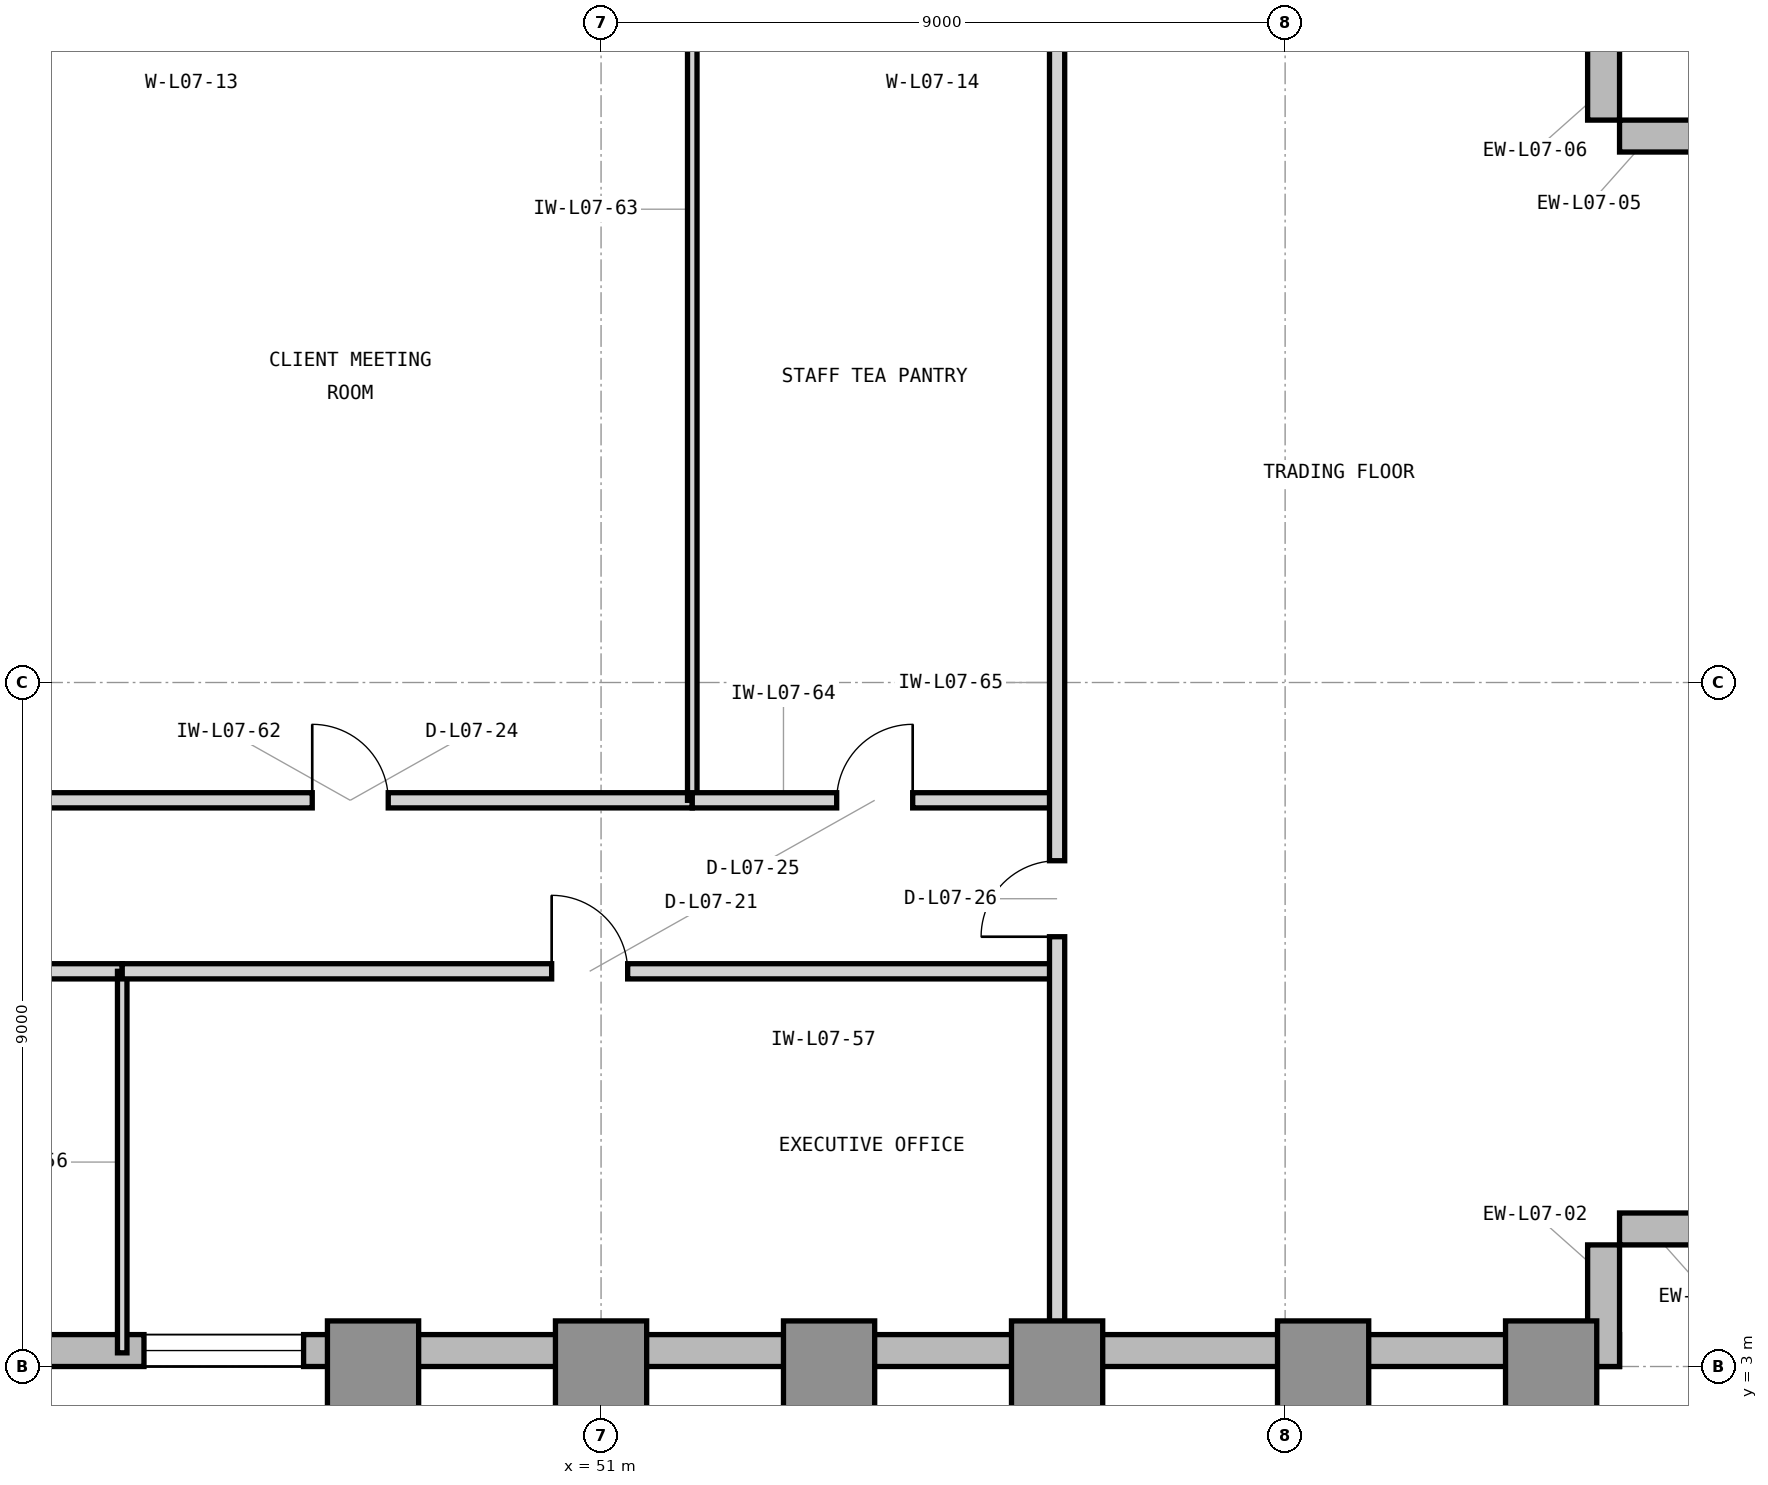
"""IFC4 building model, lengths in metres.
Left out: names, types, materials, properties, quantities, classifications, styles, units other than length and angle.
Written with IfcOpenShell. Run it as: python <this file> out.ifc"""

import sys

from ifc_helpers import new_model, si_unit, direction, frame, frame_2d, origin, origin_2d, place, context, subcontext, project, spatial, rectangle, extrude, element, fill, save


model = new_model("IFC4")
c1 = context("Model", 3, precision=1e-05, world=origin(), true_north=direction((0.0, 1.0)))
c2 = subcontext(c1, "Body", "Model", "MODEL_VIEW")
j1 = project(units=[si_unit("LENGTHUNIT", "METRE"), si_unit("PLANEANGLEUNIT", "RADIAN")], contexts=[c1])
p1 = place(None, origin())
s1 = spatial("IfcSite", under=j1, at=p1, CompositionType="ELEMENT")
p2 = place(p1, origin())
s2 = spatial("IfcBuilding", under=s1, at=p2, CompositionType="ELEMENT")
p3 = place(p2, frame((0.0, 0.0, 34.2)))
s3 = spatial("IfcBuildingStorey", under=s2, at=p3, CompositionType="ELEMENT", Elevation=34.2)
for number, where, z_axis, x_axis in (
    (1, (48.0, 3.0, 0.0), (0.0, 0.0, 1.0), (1.0, 0.0, 0.0)),
    (2, (51.0, 3.0, 0.0), (0.0, 0.0, 1.0), (1.0, 0.0, 0.0)),
    (3, (54.0, 3.0, 0.0), (0.0, 0.0, 1.0), (1.0, 0.0, 0.0)),
    (4, (57.0, 3.0, 0.0), (0.0, 0.0, 1.0), (1.0, 0.0, 0.0)),
    (5, (60.5, 3.0, 0.0), (0.0, 0.0, 1.0), (1.0, 0.0, 0.0)),
    (6, (63.5, 3.0, 0.0), (0.0, 0.0, 1.0), (1.0, 0.0, 0.0)),
):
    element("IfcColumn", number, at=place(p3, frame(where, z_axis=z_axis, x_axis=x_axis)), inside=s3, PredefinedType="COLUMN", context=c2, shape_type="SweptSolid", body=[
        extrude(rectangle(XDim=1.2, YDim=1.2, at=origin_2d()), origin(), (0.0, 0.0, 1.0), 4.2),
    ])
p4 = place(p3, frame((23.9, 3.21, 0.0), z_axis=(0.0, 0.0, 1.0), x_axis=(1.0, 0.0, 0.0)))
e7 = element("IfcWall", 7, at=p4, inside=s3, PredefinedType="STANDARD", context=c2, shape_type="SweptSolid", body=[
    extrude(rectangle(XDim=40.5, YDim=0.42, at=frame_2d((20.25, 0.0))), origin(), (0.0, 0.0, 1.0), 3.98),
])
p5 = place(p4, frame((1.1, 0.0, 0.85)))
e8 = element("IfcOpeningElement", 8, at=p5, cuts=e7, PredefinedType="OPENING", context=c2, shape_type="SweptSolid", body=[
    extrude(rectangle(XDim=1.2, YDim=2.45, at=frame_2d((0.6, 1.225))), frame((0.0, 0.22, 0.0), z_axis=(0.0, -1.0, 0.0), x_axis=(1.0, 0.0, 0.0)), (0.0, 0.0, 1.0), 0.44),
])
p6 = place(p4, frame((5.336, 0.0, 0.85)))
e9 = element("IfcOpeningElement", 9, at=p6, cuts=e7, PredefinedType="OPENING", context=c2, shape_type="SweptSolid", body=[
    extrude(rectangle(XDim=2.8, YDim=2.45, at=frame_2d((1.4, 1.225))), frame((0.0, 0.22, 0.0), z_axis=(0.0, -1.0, 0.0), x_axis=(1.0, 0.0, 0.0)), (0.0, 0.0, 1.0), 0.44),
])
p7 = place(p4, frame((14.336, 0.0, 0.85)))
e10 = element("IfcOpeningElement", 10, at=p7, cuts=e7, PredefinedType="OPENING", context=c2, shape_type="SweptSolid", body=[
    extrude(rectangle(XDim=2.8, YDim=2.45, at=frame_2d((1.4, 1.225))), frame((0.0, 0.22, 0.0), z_axis=(0.0, -1.0, 0.0), x_axis=(1.0, 0.0, 0.0)), (0.0, 0.0, 1.0), 0.44),
])
p8 = place(p4, frame((21.086, 0.0, 0.85)))
e11 = element("IfcOpeningElement", 11, at=p8, cuts=e7, PredefinedType="OPENING", context=c2, shape_type="SweptSolid", body=[
    extrude(rectangle(XDim=2.1, YDim=2.45, at=frame_2d((1.05, 1.225))), frame((0.0, 0.22, 0.0), z_axis=(0.0, -1.0, 0.0), x_axis=(1.0, 0.0, 0.0)), (0.0, 0.0, 1.0), 0.44),
])
for number, where, z_axis, x_axis in (
    (12, (64.19, 3.0, 0.0), (0.0, 0.0, 1.0), (0.0, 1.0, 0.0)),
    (13, (64.4, 4.81, 0.0), (0.0, 0.0, 1.0), (1.0, 0.0, 0.0)),
    (14, (66.0, 19.19, 0.0), (0.0, 0.0, 1.0), (-1.0, 0.0, 0.0)),
    (15, (64.19, 19.4, 0.0), (0.0, 0.0, 1.0), (0.0, 1.0, 0.0)),
):
    element("IfcWall", number, at=place(p3, frame(where, z_axis=z_axis, x_axis=x_axis)), inside=s3, PredefinedType="STANDARD", context=c2, shape_type="SweptSolid", body=[
        extrude(rectangle(XDim=1.6, YDim=0.42, at=frame_2d((0.8, 0.0))), origin(), (0.0, 0.0, 1.0), 3.98),
    ])
p9 = place(p3, frame((35.7, 8.2, 0.0), z_axis=(0.0, 0.0, 1.0), x_axis=(1.0, 0.0, 0.0)))
e16 = element("IfcWall", 16, at=p9, inside=s3, PredefinedType="PARTITIONING", context=c2, shape_type="SweptSolid", body=[
    extrude(rectangle(XDim=9.0, YDim=0.2, at=frame_2d((4.5, 0.0))), origin(), (0.0, 0.0, 1.0), 3.97),
])
p10 = place(p9, frame((3.5, 0.0, 0.0)))
e17 = element("IfcOpeningElement", 17, at=p10, cuts=e16, PredefinedType="OPENING", context=c2, shape_type="SweptSolid", body=[
    extrude(rectangle(XDim=2.0, YDim=2.5, at=frame_2d((1.0, 1.25))), frame((0.0, 0.11, 0.0), z_axis=(0.0, -1.0, 0.0), x_axis=(1.0, 0.0, 0.0)), (0.0, 0.0, 1.0), 0.22),
])
p11 = place(p3, frame((44.7, 3.18, 0.0), z_axis=(0.0, 0.0, 1.0), x_axis=(0.0, 1.0, 0.0)))
e18 = element("IfcWall", 18, at=p11, inside=s3, PredefinedType="PARTITIONING", context=c2, shape_type="SweptSolid", body=[
    extrude(rectangle(XDim=5.02, YDim=0.125, at=frame_2d((2.51, 0.0))), origin(), (0.0, 0.0, 1.0), 3.97),
])
p12 = place(p3, frame((44.7, 8.2, 0.0), z_axis=(0.0, 0.0, 1.0), x_axis=(1.0, 0.0, 0.0)))
e19 = element("IfcWall", 19, at=p12, inside=s3, PredefinedType="PARTITIONING", context=c2, shape_type="SweptSolid", body=[
    extrude(rectangle(XDim=12.3, YDim=0.2, at=frame_2d((6.15, 0.0))), origin(), (0.0, 0.0, 1.0), 3.97),
])
p13 = place(p12, frame((5.65, 0.0, 0.0)))
e20 = element("IfcOpeningElement", 20, at=p13, cuts=e19, PredefinedType="OPENING", context=c2, shape_type="SweptSolid", body=[
    extrude(rectangle(XDim=1.0, YDim=2.15, at=frame_2d((0.5, 1.075))), frame((0.0, 0.11, 0.0), z_axis=(0.0, -1.0, 0.0), x_axis=(1.0, 0.0, 0.0)), (0.0, 0.0, 1.0), 0.22),
])
p14 = place(p3, frame((43.2, 10.45, 0.0), z_axis=(0.0, 0.0, 1.0), x_axis=(1.0, 0.0, 0.0)))
e21 = element("IfcWall", 21, at=p14, inside=s3, PredefinedType="PARTITIONING", context=c2, shape_type="SweptSolid", body=[
    extrude(rectangle(XDim=9.0, YDim=0.2, at=frame_2d((4.5, 0.0))), origin(), (0.0, 0.0, 1.0), 3.97),
])
p15 = place(p14, frame((4.0, 0.0, 0.0)))
e22 = element("IfcOpeningElement", 22, at=p15, cuts=e21, PredefinedType="OPENING", context=c2, shape_type="SweptSolid", body=[
    extrude(rectangle(XDim=1.0, YDim=2.15, at=frame_2d((0.5, 1.075))), frame((0.0, 0.11, 0.0), z_axis=(0.0, -1.0, 0.0), x_axis=(1.0, 0.0, 0.0)), (0.0, 0.0, 1.0), 0.22),
])
p16 = place(p3, frame((52.2, 10.45, 0.0), z_axis=(0.0, 0.0, 1.0), x_axis=(0.0, 1.0, 0.0)))
e23 = element("IfcWall", 23, at=p16, inside=s3, PredefinedType="PARTITIONING", context=c2, shape_type="SweptSolid", body=[
    extrude(rectangle(XDim=10.37, YDim=0.125, at=frame_2d((5.185, 0.0))), origin(), (0.0, 0.0, 1.0), 3.97),
])
p17 = place(p3, frame((52.2, 10.45, 0.0), z_axis=(0.0, 0.0, 1.0), x_axis=(1.0, 0.0, 0.0)))
e24 = element("IfcWall", 24, at=p17, inside=s3, PredefinedType="PARTITIONING", context=c2, shape_type="SweptSolid", body=[
    extrude(rectangle(XDim=4.8, YDim=0.2, at=frame_2d((2.4, 0.0))), origin(), (0.0, 0.0, 1.0), 3.97),
])
p18 = place(p17, frame((1.9, 0.0, 0.0)))
e25 = element("IfcOpeningElement", 25, at=p18, cuts=e24, PredefinedType="OPENING", context=c2, shape_type="SweptSolid", body=[
    extrude(rectangle(XDim=1.0, YDim=2.15, at=frame_2d((0.5, 1.075))), frame((0.0, 0.11, 0.0), z_axis=(0.0, -1.0, 0.0), x_axis=(1.0, 0.0, 0.0)), (0.0, 0.0, 1.0), 0.22),
])
p19 = place(p3, frame((57.0, 3.18, 0.0), z_axis=(0.0, 0.0, 1.0), x_axis=(0.0, 1.0, 0.0)))
e26 = element("IfcWall", 26, at=p19, inside=s3, PredefinedType="PARTITIONING", context=c2, shape_type="SweptSolid", body=[
    extrude(rectangle(XDim=17.64, YDim=0.2, at=frame_2d((8.82, 0.0))), origin(), (0.0, 0.0, 1.0), 3.114),
])
p20 = place(p19, frame((5.475, 0.0, 0.0)))
e27 = element("IfcOpeningElement", 27, at=p20, cuts=e26, PredefinedType="OPENING", context=c2, shape_type="SweptSolid", body=[
    extrude(rectangle(XDim=1.0, YDim=2.15, at=frame_2d((0.5, 1.075))), frame((0.0, 0.11, 0.0), z_axis=(0.0, -1.0, 0.0), x_axis=(1.0, 0.0, 0.0)), (0.0, 0.0, 1.0), 0.22),
])
p21 = place(p13, origin())
e28 = element("IfcDoor", 28, at=p21, inside=s3, OperationType="SINGLE_SWING_LEFT", PredefinedType="DOOR", context=c2, shape_type="SweptSolid", body=[
    extrude(rectangle(XDim=1.0, YDim=2.15, at=frame_2d((0.5, 1.075))), frame((0.0, 0.025, 0.0), z_axis=(0.0, -1.0, 0.0), x_axis=(1.0, 0.0, 0.0)), (0.0, 0.0, 1.0), 0.05),
])
fill(e20, e28)
p22 = place(p15, origin())
e29 = element("IfcDoor", 29, at=p22, inside=s3, OperationType="SINGLE_SWING_LEFT", PredefinedType="DOOR", context=c2, shape_type="SweptSolid", body=[
    extrude(rectangle(XDim=1.0, YDim=2.15, at=frame_2d((0.5, 1.075))), frame((0.0, 0.025, 0.0), z_axis=(0.0, -1.0, 0.0), x_axis=(1.0, 0.0, 0.0)), (0.0, 0.0, 1.0), 0.05),
])
fill(e22, e29)
p23 = place(p18, origin())
e30 = element("IfcDoor", 30, at=p23, inside=s3, OperationType="SINGLE_SWING_RIGHT", PredefinedType="DOOR", context=c2, shape_type="SweptSolid", body=[
    extrude(rectangle(XDim=1.0, YDim=2.15, at=frame_2d((0.5, 1.075))), frame((0.0, 0.025, 0.0), z_axis=(0.0, -1.0, 0.0), x_axis=(1.0, 0.0, 0.0)), (0.0, 0.0, 1.0), 0.05),
])
fill(e25, e30)
p24 = place(p20, origin())
e31 = element("IfcDoor", 31, at=p24, inside=s3, OperationType="SINGLE_SWING_LEFT", PredefinedType="DOOR", context=c2, shape_type="SweptSolid", body=[
    extrude(rectangle(XDim=1.0, YDim=2.15, at=frame_2d((0.5, 1.075))), frame((0.0, 0.025, 0.0), z_axis=(0.0, -1.0, 0.0), x_axis=(1.0, 0.0, 0.0)), (0.0, 0.0, 1.0), 0.05),
])
fill(e27, e31)
p25 = place(p8, origin())
e32 = element("IfcWindow", 32, at=p25, inside=s3, PartitioningType="SINGLE_PANEL", PredefinedType="WINDOW", context=c2, shape_type="SweptSolid", body=[
    extrude(rectangle(XDim=2.1, YDim=2.45, at=frame_2d((1.05, 1.225))), frame((0.0, 0.11, 0.0), z_axis=(0.0, -1.0, 0.0), x_axis=(1.0, 0.0, 0.0)), (0.0, 0.0, 1.0), 0.06),
])
fill(e11, e32)
save(model, sys.argv[1])
